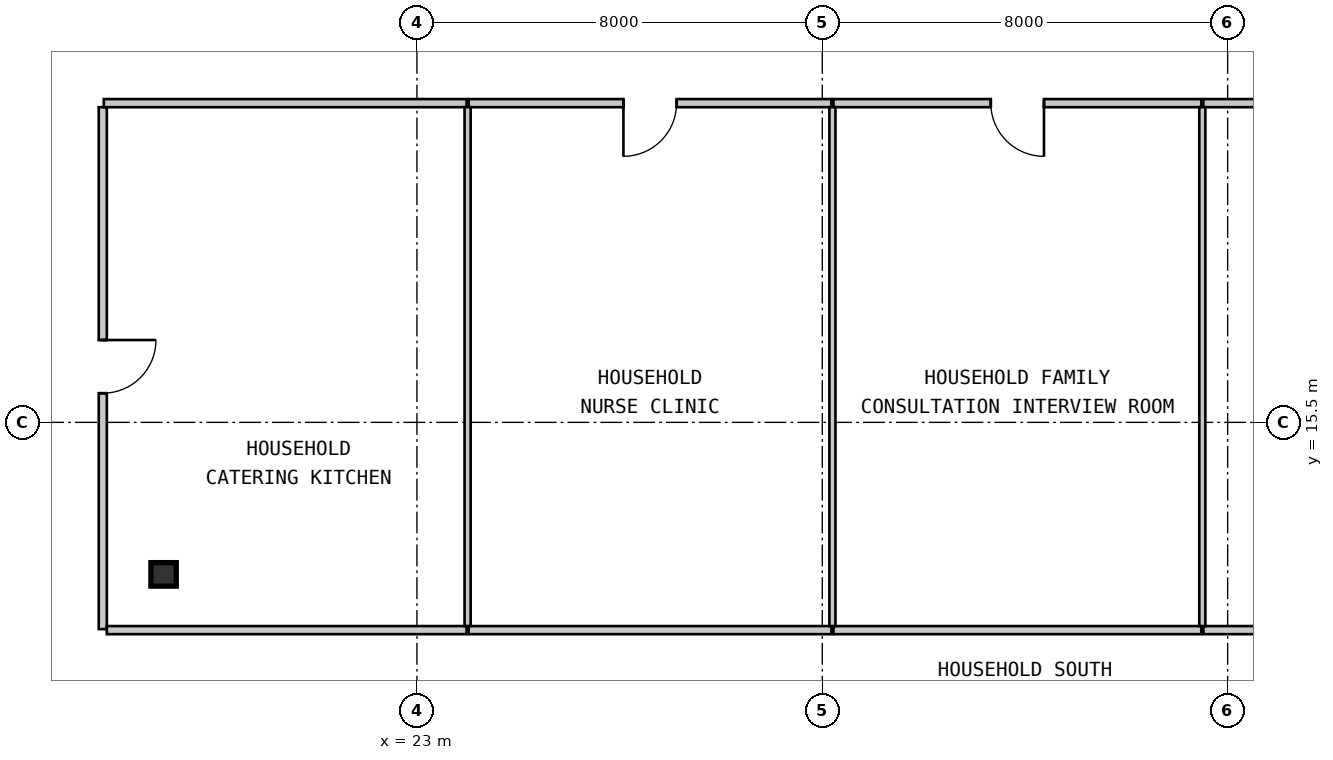
"""IFC4 building model, lengths in metres.
Left out: names, types, materials, properties, quantities, classifications, styles, units other than length and angle.
Written with IfcOpenShell. Run it as: python <this file> out.ifc"""

import sys

from ifc_helpers import new_model, si_unit, direction, frame, frame_2d, origin, origin_2d, place, context, subcontext, project, spatial, rectangle, i_section, extrude, source, transform, mapped, element, fill, save


model = new_model("IFC4")
c1 = context("Model", 3, precision=1e-05, world=origin(), true_north=direction((0.0, 1.0)))
c2 = subcontext(c1, "Body", "Model", "MODEL_VIEW")
j1 = project(units=[si_unit("LENGTHUNIT", "METRE"), si_unit("PLANEANGLEUNIT", "RADIAN")], contexts=[c1])
p1 = place(None, origin())
s1 = spatial("IfcSite", under=j1, at=p1, CompositionType="ELEMENT")
p2 = place(p1, origin())
s2 = spatial("IfcBuilding", under=s1, at=p2, CompositionType="ELEMENT")
p3 = place(p2, frame((0.0, 0.0, 32.55)))
s3 = spatial("IfcBuildingStorey", under=s2, at=p3, CompositionType="ELEMENT", Elevation=32.55)
m1 = source(origin(), c2, "Body", "SweptSolid", [
    extrude(i_section(OverallWidth=0.5, OverallDepth=0.464, WebThickness=0.022, FlangeThickness=0.034, at=origin_2d()), origin(), (0.0, 0.0, 1.0), 3.15),
])
p4 = place(p3, frame((18.0, 12.5, 0.0), z_axis=(0.0, 0.0, 1.0), x_axis=(1.0, 0.0, 0.0)))
e1 = element("IfcColumn", 1, at=p4, inside=s3, PredefinedType="COLUMN", context=c2, shape_type="MappedRepresentation", body=[
    mapped(m1, transform((0.0, 0.0, 0.0), scale=1.0)),
])
m2 = source(origin(), c2, "Body", "SweptSolid", [
    extrude(rectangle(XDim=10.3, YDim=0.16, at=frame_2d((5.15, 0.0))), origin(), (0.0, 0.0, 1.0), 2.93),
])
p5 = place(p3, frame((16.8, 21.72, 0.0), z_axis=(0.0, 0.0, 1.0), x_axis=(0.0, -1.0, 0.0)))
e2 = element("IfcWall", 2, at=p5, inside=s3, PredefinedType="PARTITIONING", context=c2, shape_type="MappedRepresentation", body=[
    mapped(m2, transform((0.0, 0.0, 0.0), scale=1.0)),
])
m3 = source(origin(), c2, "Body", "SweptSolid", [
    extrude(rectangle(XDim=1.05, YDim=2.1, at=frame_2d((0.525, 1.05))), frame((0.0, 0.09, 0.0), z_axis=(0.0, -1.0, 0.0), x_axis=(1.0, 0.0, 0.0)), (0.0, 0.0, 1.0), 0.18),
])
p6 = place(p5, frame((4.595, 0.0, 0.0)))
e3 = element("IfcOpeningElement", 3, at=p6, cuts=e2, PredefinedType="OPENING", context=c2, shape_type="MappedRepresentation", body=[
    mapped(m3, transform((0.0, 0.0, 0.0), scale=1.0)),
])
m4 = source(origin(), c2, "Body", "SweptSolid", [
    extrude(rectangle(XDim=7.159, YDim=0.16, at=frame_2d((3.58, 0.0))), origin(), (0.0, 0.0, 1.0), 2.93),
])
p7 = place(p3, frame((23.98, 21.8, 0.0), z_axis=(0.0, 0.0, 1.0), x_axis=(-1.0, 0.0, 0.0)))
e4 = element("IfcWall", 4, at=p7, inside=s3, PredefinedType="PARTITIONING", context=c2, shape_type="MappedRepresentation", body=[
    mapped(m4, transform((0.0, 0.0, 0.0), scale=1.0)),
])
p8 = place(p3, frame((31.18, 21.8, 0.0), z_axis=(0.0, 0.0, 1.0), x_axis=(-1.0, 0.0, 0.0)))
e5 = element("IfcWall", 5, at=p8, inside=s3, PredefinedType="PARTITIONING", context=c2, shape_type="MappedRepresentation", body=[
    mapped(m4, transform((0.0, 0.0, 0.0), scale=1.0)),
])
p9 = place(p8, frame((3.055, 0.0, 0.0)))
e6 = element("IfcOpeningElement", 6, at=p9, cuts=e5, PredefinedType="OPENING", context=c2, shape_type="MappedRepresentation", body=[
    mapped(m3, transform((0.0, 0.0, 0.0), scale=1.0)),
])
m5 = source(origin(), c2, "Body", "SweptSolid", [
    extrude(rectangle(XDim=7.26, YDim=0.16, at=frame_2d((3.63, 0.0))), origin(), (0.0, 0.0, 1.0), 2.93),
])
p10 = place(p3, frame((38.48, 21.8, 0.0), z_axis=(0.0, 0.0, 1.0), x_axis=(-1.0, 0.0, 0.0)))
e7 = element("IfcWall", 7, at=p10, inside=s3, PredefinedType="PARTITIONING", context=c2, shape_type="MappedRepresentation", body=[
    mapped(m5, transform((0.0, 0.0, 0.0), scale=1.0)),
])
p11 = place(p10, frame((3.105, 0.0, 0.0)))
e8 = element("IfcOpeningElement", 8, at=p11, cuts=e7, PredefinedType="OPENING", context=c2, shape_type="MappedRepresentation", body=[
    mapped(m3, transform((0.0, 0.0, 0.0), scale=1.0)),
])
p12 = place(p3, frame((45.78, 21.8, 0.0), z_axis=(0.0, 0.0, 1.0), x_axis=(-1.0, 0.0, 0.0)))
e9 = element("IfcWall", 9, at=p12, inside=s3, PredefinedType="PARTITIONING", context=c2, shape_type="MappedRepresentation", body=[
    mapped(m5, transform((0.0, 0.0, 0.0), scale=1.0)),
])
p13 = place(p12, frame((3.105, 0.0, 0.0)))
e10 = element("IfcOpeningElement", 10, at=p13, cuts=e9, PredefinedType="OPENING", context=c2, shape_type="MappedRepresentation", body=[
    mapped(m3, transform((0.0, 0.0, 0.0), scale=1.0)),
])
m6 = source(origin(), c2, "Body", "SweptSolid", [
    extrude(rectangle(XDim=7.1, YDim=0.16, at=frame_2d((3.55, 0.0))), origin(), (0.0, 0.0, 1.0), 2.93),
])
p14 = place(p3, frame((16.88, 11.4, 0.0), z_axis=(0.0, 0.0, 1.0), x_axis=(1.0, 0.0, 0.0)))
e11 = element("IfcWall", 11, at=p14, inside=s3, PredefinedType="PARTITIONING", context=c2, shape_type="MappedRepresentation", body=[
    mapped(m6, transform((0.0, 0.0, 0.0), scale=1.0)),
])
p15 = place(p3, frame((24.02, 11.4, 0.0), z_axis=(0.0, 0.0, 1.0), x_axis=(1.0, 0.0, 0.0)))
e12 = element("IfcWall", 12, at=p15, inside=s3, PredefinedType="PARTITIONING", context=c2, shape_type="MappedRepresentation", body=[
    mapped(m4, transform((0.0, 0.0, 0.0), scale=1.0)),
])
for number, where, z_axis, x_axis in (
    (13, (31.22, 11.4, 0.0), (0.0, 0.0, 1.0), (1.0, 0.0, 0.0)),
    (14, (38.52, 11.4, 0.0), (0.0, 0.0, 1.0), (1.0, 0.0, 0.0)),
):
    element("IfcWall", number, at=place(p3, frame(where, z_axis=z_axis, x_axis=x_axis)), inside=s3, PredefinedType="PARTITIONING", context=c2, shape_type="MappedRepresentation", body=[
        mapped(m5, transform((0.0, 0.0, 0.0), scale=1.0)),
    ])
m7 = source(origin(), c2, "Body", "SweptSolid", [
    extrude(rectangle(XDim=10.24, YDim=0.12, at=frame_2d((5.12, 0.0))), origin(), (0.0, 0.0, 1.0), 2.93),
])
for number, where, z_axis, x_axis in (
    (15, (24.0, 21.72, 0.0), (0.0, 0.0, 1.0), (0.0, -1.0, 0.0)),
    (16, (31.2, 21.72, 0.0), (0.0, 0.0, 1.0), (0.0, -1.0, 0.0)),
    (17, (38.5, 21.72, 0.0), (0.0, 0.0, 1.0), (0.0, -1.0, 0.0)),
):
    element("IfcWall", number, at=place(p3, frame(where, z_axis=z_axis, x_axis=x_axis)), inside=s3, PredefinedType="PARTITIONING", context=c2, shape_type="MappedRepresentation", body=[
        mapped(m7, transform((0.0, 0.0, 0.0), scale=1.0)),
    ])
m8 = source(origin(), c2, "Body", "SweptSolid", [
    extrude(rectangle(XDim=1.05, YDim=2.1, at=frame_2d((0.525, 1.05))), frame((0.0, 0.025, 0.0), z_axis=(0.0, -1.0, 0.0), x_axis=(1.0, 0.0, 0.0)), (0.0, 0.0, 1.0), 0.05),
])
p16 = place(p6, origin())
e18 = element("IfcDoor", 18, at=p16, inside=s3, OperationType="SINGLE_SWING_LEFT", PredefinedType="DOOR", context=c2, shape_type="MappedRepresentation", body=[
    mapped(m8, transform((0.0, 0.0, 0.0), scale=1.0)),
])
fill(e3, e18)
p17 = place(p9, origin())
e19 = element("IfcDoor", 19, at=p17, inside=s3, OperationType="SINGLE_SWING_RIGHT", PredefinedType="DOOR", context=c2, shape_type="MappedRepresentation", body=[
    mapped(m8, transform((0.0, 0.0, 0.0), scale=1.0)),
])
fill(e6, e19)
p18 = place(p11, origin())
e20 = element("IfcDoor", 20, at=p18, inside=s3, OperationType="SINGLE_SWING_LEFT", PredefinedType="DOOR", context=c2, shape_type="MappedRepresentation", body=[
    mapped(m8, transform((0.0, 0.0, 0.0), scale=1.0)),
])
fill(e8, e20)
save(model, sys.argv[1])
